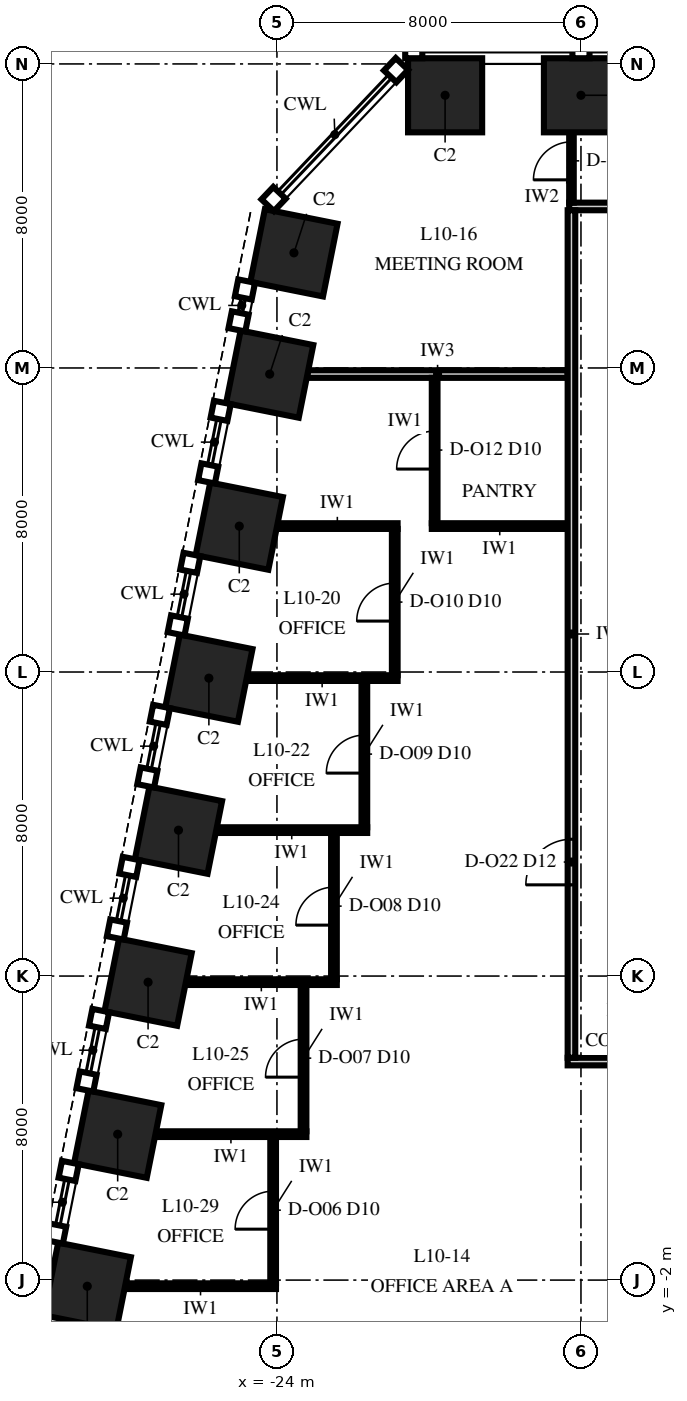
"""IFC4 building model, lengths in metres.
Left out: names, types, materials, properties, quantities, classifications, styles, units other than length and angle.
Written with IfcOpenShell. Run it as: python <this file> out.ifc"""

import sys

from ifc_helpers import new_model, si_unit, direction, frame, frame_2d, origin, origin_2d, place, context, subcontext, project, spatial, rectangle, extrude, element, fill, save


model = new_model("IFC4")
c1 = context("Model", 3, precision=1e-05, world=origin(), true_north=direction((0.0, 1.0)))
c2 = subcontext(c1, "Body", "Model", "MODEL_VIEW")
j1 = project(units=[si_unit("LENGTHUNIT", "METRE"), si_unit("PLANEANGLEUNIT", "RADIAN")], contexts=[c1])
p1 = place(None, origin())
s1 = spatial("IfcSite", under=j1, at=p1, CompositionType="ELEMENT")
p2 = place(p1, origin())
s2 = spatial("IfcBuilding", under=s1, at=p2, CompositionType="ELEMENT")
p3 = place(p2, frame((0.0, 0.0, 52.0)))
s3 = spatial("IfcBuildingStorey", under=s2, at=p3, CompositionType="ELEMENT", Elevation=52.0)
for number, where, z_axis, x_axis in (
    (1, (-16.0, 29.175, 0.0), (0.0, 0.0, 1.0), (-1.0, 0.0, 0.0)),
    (2, (-19.575, 29.175, 0.0), (0.0, 0.0, 1.0), (-1.0, 0.0, 0.0)),
    (3, (-23.553, 25.029, 0.0), (0.0, 0.0, 1.0), (-0.196, -0.981, 0.0)),
    (4, (-24.191, 21.838, 0.0), (0.0, 0.0, 1.0), (-0.196, -0.981, 0.0)),
    (5, (-24.991, 17.838, 0.0), (0.0, 0.0, 1.0), (-0.196, -0.981, 0.0)),
    (6, (-25.791, 13.838, 0.0), (0.0, 0.0, 1.0), (-0.196, -0.981, 0.0)),
    (7, (-26.591, 9.838, 0.0), (0.0, 0.0, 1.0), (-0.196, -0.981, 0.0)),
    (8, (-27.391, 5.838, 0.0), (0.0, 0.0, 1.0), (-0.196, -0.981, 0.0)),
    (9, (-28.191, 1.838, 0.0), (0.0, 0.0, 1.0), (-0.196, -0.981, 0.0)),
    (10, (-28.991, -2.162, 0.0), (0.0, 0.0, 1.0), (-0.196, -0.981, 0.0)),
):
    element("IfcColumn", number, at=place(p3, frame(where, z_axis=z_axis, x_axis=x_axis)), inside=s3, PredefinedType="COLUMN", context=c2, shape_type="SweptSolid", body=[
        extrude(rectangle(XDim=1.95, YDim=1.95, at=origin_2d()), origin(), (0.0, 0.0, 1.0), 4.0),
    ])
p4 = place(p3, frame((-27.996, -2.16, 0.0), z_axis=(0.0, 0.0, 1.0), x_axis=(1.0, 0.0, 0.0)))
e11 = element("IfcWall", 11, at=p4, inside=s3, PredefinedType="PARTITIONING", context=c2, shape_type="SweptSolid", body=[
    extrude(rectangle(XDim=3.971, YDim=0.15, at=frame_2d((1.986, 0.0))), origin(), (0.0, 0.0, 1.0), 3.25),
])
p5 = place(p3, frame((-27.196, 1.84, 0.0), z_axis=(0.0, 0.0, 1.0), x_axis=(1.0, 0.0, 0.0)))
e12 = element("IfcWall", 12, at=p5, inside=s3, PredefinedType="PARTITIONING", context=c2, shape_type="SweptSolid", body=[
    extrude(rectangle(XDim=3.971, YDim=0.15, at=frame_2d((1.986, 0.0))), origin(), (0.0, 0.0, 1.0), 3.25),
])
p6 = place(p3, frame((-16.35, 3.75, 0.0), z_axis=(0.0, 0.0, 1.0), x_axis=(1.0, 0.0, 0.0)))
e13 = element("IfcWall", 13, at=p6, inside=s3, PredefinedType="PARTITIONING", context=c2, shape_type="SweptSolid", body=[
    extrude(rectangle(XDim=32.7, YDim=0.2, at=frame_2d((16.35, 0.0))), origin(), (0.0, 0.0, 1.0), 3.25),
])
p7 = place(p6, frame((15.75, 0.0, 0.0)))
e14 = element("IfcOpeningElement", 14, at=p7, cuts=e13, PredefinedType="OPENING", context=c2, shape_type="SweptSolid", body=[
    extrude(rectangle(XDim=1.2, YDim=2.4, at=frame_2d((0.6, 1.2))), frame((0.0, 0.115, 0.0), z_axis=(0.0, -1.0, 0.0), x_axis=(1.0, 0.0, 0.0)), (0.0, 0.0, 1.0), 0.23),
])
p8 = place(p3, frame((-26.396, 5.84, 0.0), z_axis=(0.0, 0.0, 1.0), x_axis=(1.0, 0.0, 0.0)))
e15 = element("IfcWall", 15, at=p8, inside=s3, PredefinedType="PARTITIONING", context=c2, shape_type="SweptSolid", body=[
    extrude(rectangle(XDim=3.971, YDim=0.15, at=frame_2d((1.986, 0.0))), origin(), (0.0, 0.0, 1.0), 2.842),
])
for number, where, z_axis, x_axis in (
    (16, (-25.596, 9.84, 0.0), (0.0, 0.0, 1.0), (1.0, 0.0, 0.0)),
    (17, (-24.796, 13.84, 0.0), (0.0, 0.0, 1.0), (1.0, 0.0, 0.0)),
):
    element("IfcWall", number, at=place(p3, frame(where, z_axis=z_axis, x_axis=x_axis)), inside=s3, PredefinedType="PARTITIONING", context=c2, shape_type="SweptSolid", body=[
        extrude(rectangle(XDim=3.971, YDim=0.15, at=frame_2d((1.986, 0.0))), origin(), (0.0, 0.0, 1.0), 3.25),
    ])
p9 = place(p3, frame((-23.996, 17.84, 0.0), z_axis=(0.0, 0.0, 1.0), x_axis=(1.0, 0.0, 0.0)))
e18 = element("IfcWall", 18, at=p9, inside=s3, PredefinedType="PARTITIONING", context=c2, shape_type="SweptSolid", body=[
    extrude(rectangle(XDim=3.171, YDim=0.15, at=frame_2d((1.586, 0.0))), origin(), (0.0, 0.0, 1.0), 3.25),
])
p10 = place(p3, frame((-19.925, 17.84, 0.0), z_axis=(0.0, 0.0, 1.0), x_axis=(1.0, 0.0, 0.0)))
e19 = element("IfcWall", 19, at=p10, inside=s3, PredefinedType="PARTITIONING", context=c2, shape_type="SweptSolid", body=[
    extrude(rectangle(XDim=3.575, YDim=0.15, at=frame_2d((1.788, 0.0))), origin(), (0.0, 0.0, 1.0), 3.25),
])
p11 = place(p3, frame((-23.196, 21.84, 0.0), z_axis=(0.0, 0.0, 1.0), x_axis=(1.0, 0.0, 0.0)))
e20 = element("IfcWall", 20, at=p11, inside=s3, PredefinedType="PARTITIONING", context=c2, shape_type="SweptSolid", body=[
    extrude(rectangle(XDim=6.846, YDim=0.2, at=frame_2d((3.423, 0.0))), origin(), (0.0, 0.0, 1.0), 3.25),
])
p12 = place(p3, frame((-16.31, 26.25, 0.0), z_axis=(0.0, 0.0, 1.0), x_axis=(1.0, 0.0, 0.0)))
e21 = element("IfcWall", 21, at=p12, inside=s3, PredefinedType="PARTITIONING", context=c2, shape_type="SweptSolid", body=[
    extrude(rectangle(XDim=32.635, YDim=0.2, at=frame_2d((16.317, 0.0))), origin(), (0.0, 0.0, 1.0), 3.4),
])
p13 = place(p12, frame((15.71, 0.0, 0.0)))
e22 = element("IfcOpeningElement", 22, at=p13, cuts=e21, PredefinedType="OPENING", context=c2, shape_type="SweptSolid", body=[
    extrude(rectangle(XDim=1.2, YDim=2.4, at=frame_2d((0.6, 1.2))), frame((0.0, 0.115, 0.0), z_axis=(0.0, -1.0, 0.0), x_axis=(1.0, 0.0, 0.0)), (0.0, 0.0, 1.0), 0.23),
])
p14 = place(p3, frame((-24.1, -2.085, 0.0), z_axis=(0.0, 0.0, 1.0), x_axis=(0.0, 1.0, 0.0)))
e23 = element("IfcWall", 23, at=p14, inside=s3, PredefinedType="PARTITIONING", context=c2, shape_type="SweptSolid", body=[
    extrude(rectangle(XDim=3.85, YDim=0.15, at=frame_2d((1.925, 0.0))), origin(), (0.0, 0.0, 1.0), 3.85),
])
p15 = place(p14, frame((1.425, 0.0, 0.0)))
e24 = element("IfcOpeningElement", 24, at=p15, cuts=e23, PredefinedType="OPENING", context=c2, shape_type="SweptSolid", body=[
    extrude(rectangle(XDim=1.0, YDim=2.3, at=frame_2d((0.5, 1.15))), frame((0.0, 0.09, 0.0), z_axis=(0.0, -1.0, 0.0), x_axis=(1.0, 0.0, 0.0)), (0.0, 0.0, 1.0), 0.18),
])
p16 = place(p3, frame((-23.3, 1.915, 0.0), z_axis=(0.0, 0.0, 1.0), x_axis=(0.0, 1.0, 0.0)))
e25 = element("IfcWall", 25, at=p16, inside=s3, PredefinedType="PARTITIONING", context=c2, shape_type="SweptSolid", body=[
    extrude(rectangle(XDim=3.85, YDim=0.15, at=frame_2d((1.925, 0.0))), origin(), (0.0, 0.0, 1.0), 3.85),
])
p17 = place(p16, frame((1.425, 0.0, 0.0)))
e26 = element("IfcOpeningElement", 26, at=p17, cuts=e25, PredefinedType="OPENING", context=c2, shape_type="SweptSolid", body=[
    extrude(rectangle(XDim=1.0, YDim=2.3, at=frame_2d((0.5, 1.15))), frame((0.0, 0.09, 0.0), z_axis=(0.0, -1.0, 0.0), x_axis=(1.0, 0.0, 0.0)), (0.0, 0.0, 1.0), 0.18),
])
p18 = place(p3, frame((-22.5, 5.915, 0.0), z_axis=(0.0, 0.0, 1.0), x_axis=(0.0, 1.0, 0.0)))
e27 = element("IfcWall", 27, at=p18, inside=s3, PredefinedType="PARTITIONING", context=c2, shape_type="SweptSolid", body=[
    extrude(rectangle(XDim=3.85, YDim=0.15, at=frame_2d((1.925, 0.0))), origin(), (0.0, 0.0, 1.0), 2.842),
])
p19 = place(p18, frame((1.425, 0.0, 0.0)))
e28 = element("IfcOpeningElement", 28, at=p19, cuts=e27, PredefinedType="OPENING", context=c2, shape_type="SweptSolid", body=[
    extrude(rectangle(XDim=1.0, YDim=2.3, at=frame_2d((0.5, 1.15))), frame((0.0, 0.09, 0.0), z_axis=(0.0, -1.0, 0.0), x_axis=(1.0, 0.0, 0.0)), (0.0, 0.0, 1.0), 0.18),
])
p20 = place(p3, frame((-21.7, 9.915, 0.0), z_axis=(0.0, 0.0, 1.0), x_axis=(0.0, 1.0, 0.0)))
e29 = element("IfcWall", 29, at=p20, inside=s3, PredefinedType="PARTITIONING", context=c2, shape_type="SweptSolid", body=[
    extrude(rectangle(XDim=3.85, YDim=0.15, at=frame_2d((1.925, 0.0))), origin(), (0.0, 0.0, 1.0), 3.85),
])
p21 = place(p20, frame((1.425, 0.0, 0.0)))
e30 = element("IfcOpeningElement", 30, at=p21, cuts=e29, PredefinedType="OPENING", context=c2, shape_type="SweptSolid", body=[
    extrude(rectangle(XDim=1.0, YDim=2.3, at=frame_2d((0.5, 1.15))), frame((0.0, 0.09, 0.0), z_axis=(0.0, -1.0, 0.0), x_axis=(1.0, 0.0, 0.0)), (0.0, 0.0, 1.0), 0.18),
])
p22 = place(p3, frame((-20.9, 13.915, 0.0), z_axis=(0.0, 0.0, 1.0), x_axis=(0.0, 1.0, 0.0)))
e31 = element("IfcWall", 31, at=p22, inside=s3, PredefinedType="PARTITIONING", context=c2, shape_type="SweptSolid", body=[
    extrude(rectangle(XDim=3.85, YDim=0.15, at=frame_2d((1.925, 0.0))), origin(), (0.0, 0.0, 1.0), 3.25),
])
p23 = place(p22, frame((1.425, 0.0, 0.0)))
e32 = element("IfcOpeningElement", 32, at=p23, cuts=e31, PredefinedType="OPENING", context=c2, shape_type="SweptSolid", body=[
    extrude(rectangle(XDim=1.0, YDim=2.3, at=frame_2d((0.5, 1.15))), frame((0.0, 0.09, 0.0), z_axis=(0.0, -1.0, 0.0), x_axis=(1.0, 0.0, 0.0)), (0.0, 0.0, 1.0), 0.18),
])
p24 = place(p3, frame((-19.85, 17.915, 0.0), z_axis=(0.0, 0.0, 1.0), x_axis=(0.0, 1.0, 0.0)))
e33 = element("IfcWall", 33, at=p24, inside=s3, PredefinedType="PARTITIONING", context=c2, shape_type="SweptSolid", body=[
    extrude(rectangle(XDim=3.825, YDim=0.15, at=frame_2d((1.913, 0.0))), origin(), (0.0, 0.0, 1.0), 3.25),
])
p25 = place(p24, frame((1.425, 0.0, 0.0)))
e34 = element("IfcOpeningElement", 34, at=p25, cuts=e33, PredefinedType="OPENING", context=c2, shape_type="SweptSolid", body=[
    extrude(rectangle(XDim=1.0, YDim=2.3, at=frame_2d((0.5, 1.15))), frame((0.0, 0.09, 0.0), z_axis=(0.0, -1.0, 0.0), x_axis=(1.0, 0.0, 0.0)), (0.0, 0.0, 1.0), 0.18),
])
p26 = place(p3, frame((-16.25, 3.85, 0.0), z_axis=(0.0, 0.0, 1.0), x_axis=(0.0, 1.0, 0.0)))
e35 = element("IfcWall", 35, at=p26, inside=s3, PredefinedType="PARTITIONING", context=c2, shape_type="SweptSolid", body=[
    extrude(rectangle(XDim=22.3, YDim=0.2, at=frame_2d((11.15, 0.0))), origin(), (0.0, 0.0, 1.0), 2.842),
])
p27 = place(p26, frame((4.55, 0.0, 0.0)))
e36 = element("IfcOpeningElement", 36, at=p27, cuts=e35, PredefinedType="OPENING", context=c2, shape_type="SweptSolid", body=[
    extrude(rectangle(XDim=1.2, YDim=2.4, at=frame_2d((0.6, 1.2))), frame((0.0, 0.115, 0.0), z_axis=(0.0, -1.0, 0.0), x_axis=(1.0, 0.0, 0.0)), (0.0, 0.0, 1.0), 0.23),
])
p28 = place(p3, frame((-16.25, 26.35, 0.0), z_axis=(0.0, 0.0, 1.0), x_axis=(0.0, 1.0, 0.0)))
e37 = element("IfcWall", 37, at=p28, inside=s3, PredefinedType="PARTITIONING", context=c2, shape_type="SweptSolid", body=[
    extrude(rectangle(XDim=1.85, YDim=0.12, at=frame_2d((0.925, 0.0))), origin(), (0.0, 0.0, 1.0), 3.85),
])
p29 = place(p28, frame((0.6, 0.0, 0.0)))
e38 = element("IfcOpeningElement", 38, at=p29, cuts=e37, PredefinedType="OPENING", context=c2, shape_type="SweptSolid", body=[
    extrude(rectangle(XDim=1.0, YDim=2.4, at=frame_2d((0.5, 1.2))), frame((0.0, 0.075, 0.0), z_axis=(0.0, -1.0, 0.0), x_axis=(1.0, 0.0, 0.0)), (0.0, 0.0, 1.0), 0.15),
])
p30 = place(p15, origin())
e39 = element("IfcDoor", 39, at=p30, inside=s3, OperationType="SINGLE_SWING_LEFT", PredefinedType="DOOR", context=c2, shape_type="SweptSolid", body=[
    extrude(rectangle(XDim=1.0, YDim=2.3, at=frame_2d((0.5, 1.15))), frame((0.0, 0.075, 0.0), z_axis=(0.0, -1.0, 0.0), x_axis=(1.0, 0.0, 0.0)), (0.0, 0.0, 1.0), 0.149),
])
fill(e24, e39)
p31 = place(p17, origin())
e40 = element("IfcDoor", 40, at=p31, inside=s3, OperationType="SINGLE_SWING_LEFT", PredefinedType="DOOR", context=c2, shape_type="SweptSolid", body=[
    extrude(rectangle(XDim=1.0, YDim=2.3, at=frame_2d((0.5, 1.15))), frame((0.0, 0.075, 0.0), z_axis=(0.0, -1.0, 0.0), x_axis=(1.0, 0.0, 0.0)), (0.0, 0.0, 1.0), 0.149),
])
fill(e26, e40)
p32 = place(p19, origin())
e41 = element("IfcDoor", 41, at=p32, inside=s3, OperationType="SINGLE_SWING_LEFT", PredefinedType="DOOR", context=c2, shape_type="SweptSolid", body=[
    extrude(rectangle(XDim=1.0, YDim=2.3, at=frame_2d((0.5, 1.15))), frame((0.0, 0.075, 0.0), z_axis=(0.0, -1.0, 0.0), x_axis=(1.0, 0.0, 0.0)), (0.0, 0.0, 1.0), 0.149),
])
fill(e28, e41)
p33 = place(p21, origin())
e42 = element("IfcDoor", 42, at=p33, inside=s3, OperationType="SINGLE_SWING_LEFT", PredefinedType="DOOR", context=c2, shape_type="SweptSolid", body=[
    extrude(rectangle(XDim=1.0, YDim=2.3, at=frame_2d((0.5, 1.15))), frame((0.0, 0.075, 0.0), z_axis=(0.0, -1.0, 0.0), x_axis=(1.0, 0.0, 0.0)), (0.0, 0.0, 1.0), 0.149),
])
fill(e30, e42)
p34 = place(p23, origin())
e43 = element("IfcDoor", 43, at=p34, inside=s3, OperationType="SINGLE_SWING_LEFT", PredefinedType="DOOR", context=c2, shape_type="SweptSolid", body=[
    extrude(rectangle(XDim=1.0, YDim=2.3, at=frame_2d((0.5, 1.15))), frame((0.0, 0.075, 0.0), z_axis=(0.0, -1.0, 0.0), x_axis=(1.0, 0.0, 0.0)), (0.0, 0.0, 1.0), 0.149),
])
fill(e32, e43)
p35 = place(p25, origin())
e44 = element("IfcDoor", 44, at=p35, inside=s3, OperationType="SINGLE_SWING_LEFT", PredefinedType="DOOR", context=c2, shape_type="SweptSolid", body=[
    extrude(rectangle(XDim=1.0, YDim=2.3, at=frame_2d((0.5, 1.15))), frame((0.0, 0.075, 0.0), z_axis=(0.0, -1.0, 0.0), x_axis=(1.0, 0.0, 0.0)), (0.0, 0.0, 1.0), 0.149),
])
fill(e34, e44)
p36 = place(p29, origin())
e45 = element("IfcDoor", 45, at=p36, inside=s3, OperationType="SINGLE_SWING_RIGHT", PredefinedType="DOOR", context=c2, shape_type="SweptSolid", body=[
    extrude(rectangle(XDim=1.0, YDim=2.4, at=frame_2d((0.5, 1.2))), frame((0.0, 0.06, 0.0), z_axis=(0.0, -1.0, 0.0), x_axis=(1.0, 0.0, 0.0)), (0.0, 0.0, 1.0), 0.12),
])
fill(e38, e45)
p37 = place(p27, origin())
e46 = element("IfcDoor", 46, at=p37, inside=s3, OperationType="SINGLE_SWING_LEFT", PredefinedType="DOOR", context=c2, shape_type="SweptSolid", body=[
    extrude(rectangle(XDim=1.2, YDim=2.4, at=frame_2d((0.6, 1.2))), frame((0.0, 0.1, 0.0), z_axis=(0.0, -1.0, 0.0), x_axis=(1.0, 0.0, 0.0)), (0.0, 0.0, 1.0), 0.199),
])
fill(e36, e46)
save(model, sys.argv[1])
